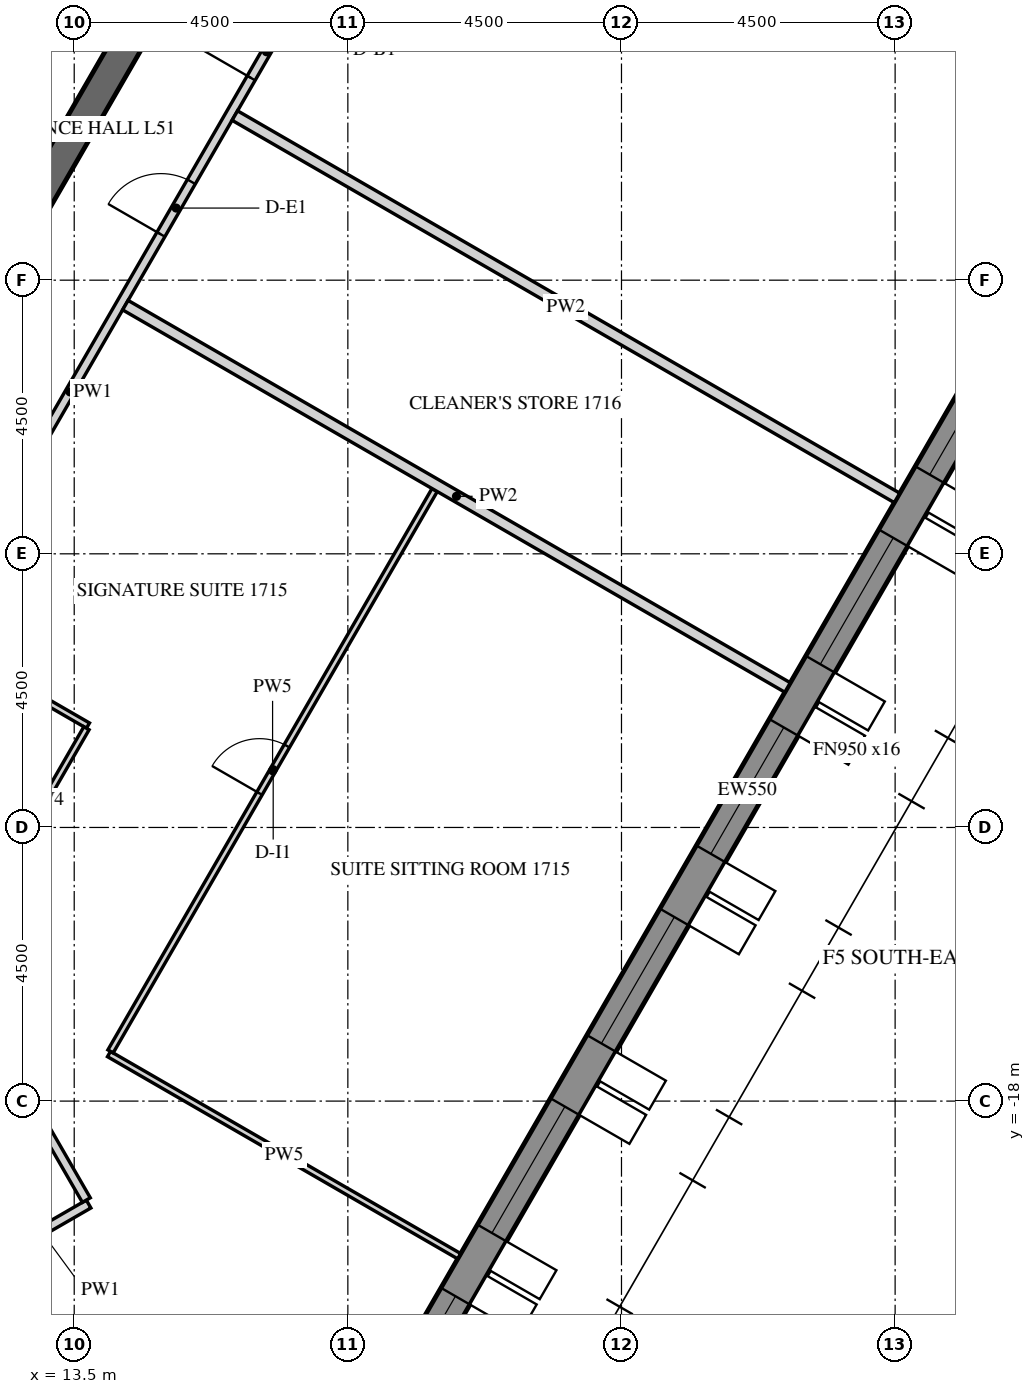
"""IFC4 building model, lengths in metres.
Left out: names, types, materials, properties, quantities, classifications, styles, units other than length and angle.
Written with IfcOpenShell. Run it as: python <this file> out.ifc"""

import sys

from ifc_helpers import new_model, si_unit, direction, frame, frame_2d, origin, place, context, subcontext, project, spatial, polyline, rectangle, outline, extrude, element, fill, save


model = new_model("IFC4")
c1 = context("Model", 3, precision=1e-05, world=origin(), true_north=direction((0.0, 1.0)))
c2 = subcontext(c1, "Body", "Model", "MODEL_VIEW")
j1 = project(units=[si_unit("LENGTHUNIT", "METRE"), si_unit("PLANEANGLEUNIT", "RADIAN")], contexts=[c1])
p1 = place(None, origin())
s1 = spatial("IfcSite", under=j1, at=p1, CompositionType="ELEMENT")
p2 = place(p1, origin())
s2 = spatial("IfcBuilding", under=s1, at=p2, CompositionType="ELEMENT")
p3 = place(p2, frame((0.0, 0.0, 215.1)))
s3 = spatial("IfcBuildingStorey", under=s2, at=p3, CompositionType="ELEMENT", Elevation=215.1)
p4 = place(p3, frame((17.63, -24.914, -0.15), z_axis=(0.0, 0.0, 1.0), x_axis=(0.499998569178, 0.866026229868, 0.0)))
e1 = element("IfcWall", 1, at=p4, inside=s3, PredefinedType="SOLIDWALL", context=c2, shape_type="SweptSolid", body=[
    extrude(outline(polyline([(-0.022, -0.275), (27.783, -0.275), (27.732, 0.275), (0.022, 0.275), (-0.022, -0.275)])), origin(), (0.0, 0.0, 1.0), 3.9),
])
p5 = place(p4, frame((1.879, 0.0, 1.05)))
e2 = element("IfcOpeningElement", 2, at=p5, cuts=e1, PredefinedType="OPENING", context=c2, shape_type="SweptSolid", body=[
    extrude(rectangle(XDim=2.4, YDim=2.4, at=frame_2d((1.2, 1.2))), frame((0.0, 0.285, 0.0), z_axis=(0.0, -1.0, 0.0), x_axis=(1.0, 0.0, 0.0)), (0.0, 0.0, 1.0), 0.57),
])
p6 = place(p4, frame((5.479, 0.0, 1.05)))
e3 = element("IfcOpeningElement", 3, at=p6, cuts=e1, PredefinedType="OPENING", context=c2, shape_type="SweptSolid", body=[
    extrude(rectangle(XDim=2.4, YDim=2.4, at=frame_2d((1.2, 1.2))), frame((0.0, 0.285, 0.0), z_axis=(0.0, -1.0, 0.0), x_axis=(1.0, 0.0, 0.0)), (0.0, 0.0, 1.0), 0.57),
])
p7 = place(p4, frame((9.079, 0.0, 1.05)))
e4 = element("IfcOpeningElement", 4, at=p7, cuts=e1, PredefinedType="OPENING", context=c2, shape_type="SweptSolid", body=[
    extrude(rectangle(XDim=2.4, YDim=2.4, at=frame_2d((1.2, 1.2))), frame((0.0, 0.285, 0.0), z_axis=(0.0, -1.0, 0.0), x_axis=(1.0, 0.0, 0.0)), (0.0, 0.0, 1.0), 0.57),
])
p8 = place(p4, frame((12.679, 0.0, 1.05)))
e5 = element("IfcOpeningElement", 5, at=p8, cuts=e1, PredefinedType="OPENING", context=c2, shape_type="SweptSolid", body=[
    extrude(rectangle(XDim=2.4, YDim=2.4, at=frame_2d((1.2, 1.2))), frame((0.0, 0.285, 0.0), z_axis=(0.0, -1.0, 0.0), x_axis=(1.0, 0.0, 0.0)), (0.0, 0.0, 1.0), 0.57),
])
p9 = place(p4, frame((16.279, 0.0, 1.05)))
e6 = element("IfcOpeningElement", 6, at=p9, cuts=e1, PredefinedType="OPENING", context=c2, shape_type="SweptSolid", body=[
    extrude(rectangle(XDim=2.4, YDim=2.4, at=frame_2d((1.2, 1.2))), frame((0.0, 0.285, 0.0), z_axis=(0.0, -1.0, 0.0), x_axis=(1.0, 0.0, 0.0)), (0.0, 0.0, 1.0), 0.57),
])
p10 = place(p4, frame((19.879, 0.0, 1.05)))
e7 = element("IfcOpeningElement", 7, at=p10, cuts=e1, PredefinedType="OPENING", context=c2, shape_type="SweptSolid", body=[
    extrude(rectangle(XDim=2.4, YDim=2.4, at=frame_2d((1.2, 1.2))), frame((0.0, 0.285, 0.0), z_axis=(0.0, -1.0, 0.0), x_axis=(1.0, 0.0, 0.0)), (0.0, 0.0, 1.0), 0.57),
])
p11 = place(p4, frame((23.479, 0.0, 1.05)))
e8 = element("IfcOpeningElement", 8, at=p11, cuts=e1, PredefinedType="OPENING", context=c2, shape_type="SweptSolid", body=[
    extrude(rectangle(XDim=2.4, YDim=2.4, at=frame_2d((1.2, 1.2))), frame((0.0, 0.285, 0.0), z_axis=(0.0, -1.0, 0.0), x_axis=(1.0, 0.0, 0.0)), (0.0, 0.0, 1.0), 0.57),
])
p12 = place(p3, frame((7.361, -12.75, -0.15), z_axis=(0.0, 0.0, 1.0), x_axis=(0.50000571537, 0.866022103989, 0.0)))
e9 = element("IfcWall", 9, at=p12, inside=s3, PredefinedType="SHEAR", context=c2, shape_type="SweptSolid", body=[
    extrude(outline(polyline([(-0.144, -0.25), (14.867, -0.25), (14.578, 0.25), (0.144, 0.25), (-0.144, -0.25)])), origin(), (0.0, 0.0, 1.0), 3.9),
])
p13 = place(p12, frame((6.49, 0.0, 0.15)))
e10 = element("IfcOpeningElement", 10, at=p13, cuts=e9, PredefinedType="OPENING", context=c2, shape_type="SweptSolid", body=[
    extrude(rectangle(XDim=1.8, YDim=2.4, at=frame_2d((0.9, 1.2))), frame((0.0, 0.26, 0.0), z_axis=(0.0, -1.0, 0.0), x_axis=(1.0, 0.0, 0.0)), (0.0, 0.0, 1.0), 0.52),
])
p14 = place(p3, frame((7.506, -13.0, -0.15), z_axis=(0.0, 0.0, 1.0), x_axis=(0.499988271576, -0.866032175087, 0.0)))
e11 = element("IfcWall", 11, at=p14, inside=s3, PredefinedType="SHEAR", context=c2, shape_type="SweptSolid", body=[
    extrude(rectangle(XDim=15.424, YDim=0.5, at=frame_2d((7.712, 0.0))), origin(), (0.0, 0.0, 1.0), 3.9),
])
p15 = place(p14, frame((6.812, 0.0, 0.15)))
e12 = element("IfcOpeningElement", 12, at=p15, cuts=e11, PredefinedType="OPENING", context=c2, shape_type="SweptSolid", body=[
    extrude(rectangle(XDim=1.8, YDim=2.4, at=frame_2d((0.9, 1.2))), frame((0.0, 0.26, 0.0), z_axis=(0.0, -1.0, 0.0), x_axis=(1.0, 0.0, 0.0)), (0.0, 0.0, 1.0), 0.52),
])
p16 = place(p3, frame((12.178, -20.593, 0.0), z_axis=(0.0, 0.0, 1.0), x_axis=(0.866047807691, 0.499961193289, 0.0)))
e13 = element("IfcWall", 13, at=p16, inside=s3, PredefinedType="PARTITIONING", context=c2, shape_type="SweptSolid", body=[
    extrude(rectangle(XDim=1.8, YDim=0.15, at=frame_2d((0.9, 0.0))), origin(), (0.0, 0.0, 1.0), 2.988),
])
p17 = place(p3, frame((13.699, -19.628, 0.0), z_axis=(0.0, 0.0, 1.0), x_axis=(-0.499997422768, 0.866026891745, 0.0)))
e14 = element("IfcWall", 14, at=p17, inside=s3, PredefinedType="PARTITIONING", context=c2, shape_type="SweptSolid", body=[
    extrude(rectangle(XDim=7.942, YDim=0.15, at=frame_2d((3.971, 0.0))), origin(), (0.0, 0.0, 1.0), 2.988),
])
p18 = place(p3, frame((9.772, -12.675, 0.0), z_axis=(0.0, 0.0, 1.0), x_axis=(0.499996322767, 0.866027526826, 0.0)))
e15 = element("IfcWall", 15, at=p18, inside=s3, PredefinedType="PARTITIONING", context=c2, shape_type="SweptSolid", body=[
    extrude(rectangle(XDim=14.636, YDim=0.15, at=frame_2d((7.318, 0.0))), origin(), (0.0, 0.0, 1.0), 2.988),
])
p19 = place(p18, frame((5.361, 0.0, 0.0)))
e16 = element("IfcOpeningElement", 16, at=p19, cuts=e15, PredefinedType="OPENING", context=c2, shape_type="SweptSolid", body=[
    extrude(rectangle(XDim=1.0, YDim=2.1, at=frame_2d((0.5, 1.05))), frame((0.0, 0.085, 0.0), z_axis=(0.0, -1.0, 0.0), x_axis=(1.0, 0.0, 0.0)), (0.0, 0.0, 1.0), 0.17),
])
p20 = place(p18, frame((10.309, 0.0, 0.0)))
e17 = element("IfcOpeningElement", 17, at=p20, cuts=e15, PredefinedType="OPENING", context=c2, shape_type="SweptSolid", body=[
    extrude(rectangle(XDim=1.0, YDim=2.1, at=frame_2d((0.5, 1.05))), frame((0.0, 0.085, 0.0), z_axis=(0.0, -1.0, 0.0), x_axis=(1.0, 0.0, 0.0)), (0.0, 0.0, 1.0), 0.17),
])
p21 = place(p18, frame((13.278, 0.0, 0.0)))
e18 = element("IfcOpeningElement", 18, at=p21, cuts=e15, PredefinedType="OPENING", context=c2, shape_type="SweptSolid", body=[
    extrude(rectangle(XDim=1.0, YDim=2.1, at=frame_2d((0.5, 1.05))), frame((0.0, 0.085, 0.0), z_axis=(0.0, -1.0, 0.0), x_axis=(1.0, 0.0, 0.0)), (0.0, 0.0, 1.0), 0.17),
])
p22 = place(p3, frame((11.193, -10.363, 0.0), z_axis=(0.0, 0.0, 1.0), x_axis=(0.865989585315, -0.500062034277, 0.0)))
e19 = element("IfcWall", 19, at=p22, inside=s3, PredefinedType="PARTITIONING", context=c2, shape_type="SweptSolid", body=[
    extrude(rectangle(XDim=2.925, YDim=0.1, at=frame_2d((1.462, 0.0))), origin(), (0.0, 0.0, 1.0), 2.988),
])
p23 = place(p22, frame((1.025, 0.0, 0.0)))
e20 = element("IfcOpeningElement", 20, at=p23, cuts=e19, PredefinedType="OPENING", context=c2, shape_type="SweptSolid", body=[
    extrude(rectangle(XDim=0.8, YDim=2.1, at=frame_2d((0.4, 1.05))), frame((0.0, 0.06, 0.0), z_axis=(0.0, -1.0, 0.0), x_axis=(1.0, 0.0, 0.0)), (0.0, 0.0, 1.0), 0.12),
])
p24 = place(p3, frame((13.701, -11.868, 0.0), z_axis=(0.0, 0.0, 1.0), x_axis=(-0.499996545922, -0.866027397988, 0.0)))
e21 = element("IfcWall", 21, at=p24, inside=s3, PredefinedType="PARTITIONING", context=c2, shape_type="SweptSolid", body=[
    extrude(rectangle(XDim=2.75, YDim=0.1, at=frame_2d((1.375, 0.0))), origin(), (0.0, 0.0, 1.0), 2.988),
])
p25 = place(p3, frame((19.831, -20.551, 0.0), z_axis=(0.0, 0.0, 1.0), x_axis=(-0.866027239912, 0.49999681972, 0.0)))
e22 = element("IfcWall", 22, at=p25, inside=s3, PredefinedType="PARTITIONING", context=c2, shape_type="SweptSolid", body=[
    extrude(rectangle(XDim=6.65, YDim=0.1, at=frame_2d((3.325, 0.0))), origin(), (0.0, 0.0, 1.0), 2.988),
])
p26 = place(p3, frame((14.097, -17.183, 0.0), z_axis=(0.0, 0.0, 1.0), x_axis=(0.500001321243, 0.866024640963, 0.0)))
e23 = element("IfcWall", 23, at=p26, inside=s3, PredefinedType="PARTITIONING", context=c2, shape_type="SweptSolid", body=[
    extrude(rectangle(XDim=10.66, YDim=0.1, at=frame_2d((5.33, 0.0))), origin(), (0.0, 0.0, 1.0), 2.988),
])
p27 = place(p26, frame((4.9, 0.0, 0.0)))
e24 = element("IfcOpeningElement", 24, at=p27, cuts=e23, PredefinedType="OPENING", context=c2, shape_type="SweptSolid", body=[
    extrude(rectangle(XDim=0.9, YDim=2.1, at=frame_2d((0.45, 1.05))), frame((0.0, 0.06, 0.0), z_axis=(0.0, -1.0, 0.0), x_axis=(1.0, 0.0, 0.0)), (0.0, 0.0, 1.0), 0.12),
])
p28 = place(p3, frame((25.231, -11.198, 0.0), z_axis=(0.0, 0.0, 1.0), x_axis=(-0.866032662629, 0.499987427101, 0.0)))
e25 = element("IfcWall", 25, at=p28, inside=s3, PredefinedType="PARTITIONING", context=c2, shape_type="SweptSolid", body=[
    extrude(rectangle(XDim=12.575, YDim=0.18, at=frame_2d((6.288, 0.0))), origin(), (0.0, 0.0, 1.0), 2.988),
])
p29 = place(p3, frame((27.031, -8.08, 0.0), z_axis=(0.0, 0.0, 1.0), x_axis=(-0.86602780907, 0.499995833901, 0.0)))
e26 = element("IfcWall", 26, at=p29, inside=s3, PredefinedType="PARTITIONING", context=c2, shape_type="SweptSolid", body=[
    extrude(rectangle(XDim=12.575, YDim=0.18, at=frame_2d((6.287, 0.0))), origin(), (0.0, 0.0, 1.0), 2.988),
])
p30 = place(p5, frame((0.0, 0.205, 0.0)))
e27 = element("IfcWindow", 27, at=p30, inside=s3, PartitioningType="DOUBLE_PANEL_VERTICAL", PredefinedType="WINDOW", context=c2, shape_type="SweptSolid", body=[
    extrude(rectangle(XDim=2.4, YDim=2.4, at=frame_2d((1.2, 1.2))), frame((0.0, 0.03, 0.0), z_axis=(0.0, -1.0, 0.0), x_axis=(1.0, 0.0, 0.0)), (0.0, 0.0, 1.0), 0.06),
])
fill(e2, e27)
p31 = place(p6, frame((0.0, 0.205, 0.0)))
e28 = element("IfcWindow", 28, at=p31, inside=s3, PartitioningType="DOUBLE_PANEL_VERTICAL", PredefinedType="WINDOW", context=c2, shape_type="SweptSolid", body=[
    extrude(rectangle(XDim=2.4, YDim=2.4, at=frame_2d((1.2, 1.2))), frame((0.0, 0.03, 0.0), z_axis=(0.0, -1.0, 0.0), x_axis=(1.0, 0.0, 0.0)), (0.0, 0.0, 1.0), 0.06),
])
fill(e3, e28)
p32 = place(p7, frame((0.0, 0.205, 0.0)))
e29 = element("IfcWindow", 29, at=p32, inside=s3, PartitioningType="DOUBLE_PANEL_VERTICAL", PredefinedType="WINDOW", context=c2, shape_type="SweptSolid", body=[
    extrude(rectangle(XDim=2.4, YDim=2.4, at=frame_2d((1.2, 1.2))), frame((0.0, 0.03, 0.0), z_axis=(0.0, -1.0, 0.0), x_axis=(1.0, 0.0, 0.0)), (0.0, 0.0, 1.0), 0.06),
])
fill(e4, e29)
p33 = place(p8, frame((0.0, 0.205, 0.0)))
e30 = element("IfcWindow", 30, at=p33, inside=s3, PartitioningType="DOUBLE_PANEL_VERTICAL", PredefinedType="WINDOW", context=c2, shape_type="SweptSolid", body=[
    extrude(rectangle(XDim=2.4, YDim=2.4, at=frame_2d((1.2, 1.2))), frame((0.0, 0.03, 0.0), z_axis=(0.0, -1.0, 0.0), x_axis=(1.0, 0.0, 0.0)), (0.0, 0.0, 1.0), 0.06),
])
fill(e5, e30)
p34 = place(p9, frame((0.0, 0.205, 0.0)))
e31 = element("IfcWindow", 31, at=p34, inside=s3, PartitioningType="DOUBLE_PANEL_VERTICAL", PredefinedType="WINDOW", context=c2, shape_type="SweptSolid", body=[
    extrude(rectangle(XDim=2.4, YDim=2.4, at=frame_2d((1.2, 1.2))), frame((0.0, 0.03, 0.0), z_axis=(0.0, -1.0, 0.0), x_axis=(1.0, 0.0, 0.0)), (0.0, 0.0, 1.0), 0.06),
])
fill(e6, e31)
p35 = place(p10, frame((0.0, 0.205, 0.0)))
e32 = element("IfcWindow", 32, at=p35, inside=s3, PartitioningType="DOUBLE_PANEL_VERTICAL", PredefinedType="WINDOW", context=c2, shape_type="SweptSolid", body=[
    extrude(rectangle(XDim=2.4, YDim=2.4, at=frame_2d((1.2, 1.2))), frame((0.0, 0.03, 0.0), z_axis=(0.0, -1.0, 0.0), x_axis=(1.0, 0.0, 0.0)), (0.0, 0.0, 1.0), 0.06),
])
fill(e7, e32)
p36 = place(p27, origin())
e33 = element("IfcDoor", 33, at=p36, inside=s3, OperationType="SINGLE_SWING_LEFT", PredefinedType="DOOR", context=c2, shape_type="SweptSolid", body=[
    extrude(rectangle(XDim=0.9, YDim=2.1, at=frame_2d((0.45, 1.05))), frame((0.0, 0.025, 0.0), z_axis=(0.0, -1.0, 0.0), x_axis=(1.0, 0.0, 0.0)), (0.0, 0.0, 1.0), 0.05),
])
fill(e24, e33)
p37 = place(p20, origin())
e34 = element("IfcDoor", 34, at=p37, inside=s3, OperationType="SINGLE_SWING_LEFT", PredefinedType="DOOR", context=c2, shape_type="SweptSolid", body=[
    extrude(rectangle(XDim=1.0, YDim=2.1, at=frame_2d((0.5, 1.05))), frame((0.0, 0.025, 0.0), z_axis=(0.0, -1.0, 0.0), x_axis=(1.0, 0.0, 0.0)), (0.0, 0.0, 1.0), 0.05),
])
fill(e17, e34)
p38 = place(p21, origin())
e35 = element("IfcDoor", 35, at=p38, inside=s3, OperationType="SINGLE_SWING_LEFT", PredefinedType="DOOR", context=c2, shape_type="SweptSolid", body=[
    extrude(rectangle(XDim=1.0, YDim=2.1, at=frame_2d((0.5, 1.05))), frame((0.0, 0.025, 0.0), z_axis=(0.0, -1.0, 0.0), x_axis=(1.0, 0.0, 0.0)), (0.0, 0.0, 1.0), 0.05),
])
fill(e18, e35)
save(model, sys.argv[1])
